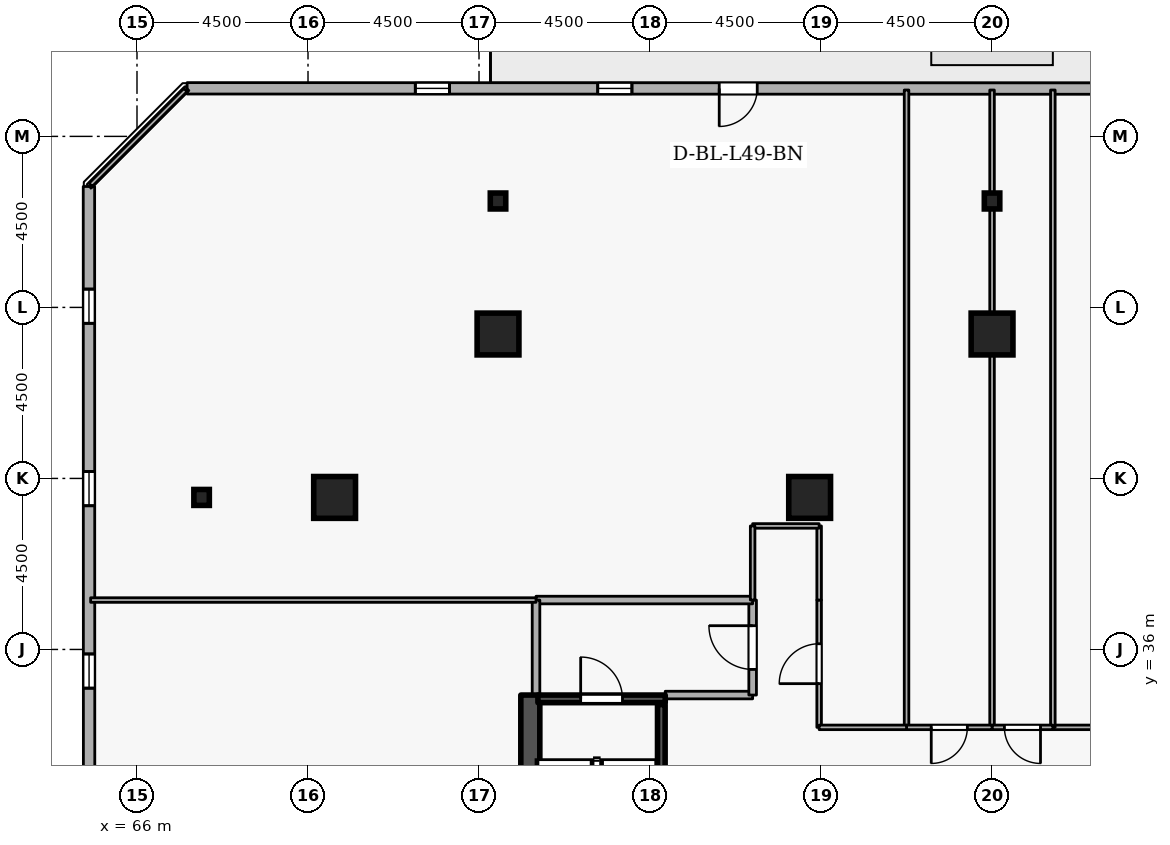
"""IFC4 building model, lengths in metres.
Left out: names, types, materials, properties, quantities, classifications, styles, units other than length and angle.
Written with IfcOpenShell. Run it as: python <this file> out.ifc"""

import sys

from ifc_helpers import new_model, si_unit, direction, frame, frame_2d, origin, origin_2d, place, context, subcontext, project, spatial, rectangle, i_section, extrude, element, fill, save


model = new_model("IFC4")
c1 = context("Model", 3, precision=1e-05, world=origin(), true_north=direction((0.0, 1.0)))
c2 = subcontext(c1, "Body", "Model", "MODEL_VIEW")
j1 = project(units=[si_unit("LENGTHUNIT", "METRE"), si_unit("PLANEANGLEUNIT", "RADIAN")], contexts=[c1])
p1 = place(None, origin())
s1 = spatial("IfcSite", under=j1, at=p1, CompositionType="ELEMENT")
p2 = place(p1, origin())
s2 = spatial("IfcBuilding", under=s1, at=p2, CompositionType="ELEMENT")
p3 = place(p2, frame((0.0, 0.0, 185.7)))
s3 = spatial("IfcBuildingStorey", under=s2, at=p3, CompositionType="ELEMENT", Elevation=185.7)
p4 = place(p3, frame((76.35, 19.2, 0.0), z_axis=(0.0, 0.0, 1.0), x_axis=(0.0, 1.0, 0.0)))
e1 = element("IfcWall", 1, at=p4, inside=s3, PredefinedType="SHEAR", context=c2, shape_type="SweptSolid", body=[
    extrude(rectangle(XDim=15.6, YDim=0.5, at=frame_2d((7.8, 0.0))), origin(), (0.0, 0.0, 1.0), 3.6),
])
for number, where, z_axis, x_axis in (
    (2, (88.5, 44.3, 0.0), (0.0, 0.0, 1.0), (1.0, 0.0, 0.0)),
    (3, (75.5, 44.3, 0.0), (0.0, 0.0, 1.0), (1.0, 0.0, 0.0)),
    (4, (71.2, 40.0, 0.0), (0.0, 0.0, 1.0), (1.0, 0.0, 0.0)),
    (5, (83.7, 40.0, 0.0), (0.0, 0.0, 1.0), (1.0, 0.0, 0.0)),
):
    element("IfcColumn", number, at=place(p3, frame(where, z_axis=z_axis, x_axis=x_axis)), inside=s3, PredefinedType="COLUMN", context=c2, shape_type="SweptSolid", body=[
        extrude(rectangle(XDim=1.1, YDim=1.1, at=origin_2d()), origin(), (0.0, 0.0, 1.0), 3.6),
    ])
for number, where, z_axis, x_axis in (
    (6, (88.5, 47.8, 0.0), (0.0, 0.0, 1.0), (1.0, 0.0, 0.0)),
    (7, (75.5, 47.8, 0.0), (0.0, 0.0, 1.0), (1.0, 0.0, 0.0)),
    (8, (67.7, 40.0, 0.0), (0.0, 0.0, 1.0), (1.0, 0.0, 0.0)),
):
    element("IfcColumn", number, at=place(p3, frame(where, z_axis=z_axis, x_axis=x_axis)), inside=s3, PredefinedType="COLUMN", context=c2, shape_type="SweptSolid", body=[
        extrude(i_section(OverallWidth=0.407, OverallDepth=0.419, WebThickness=0.031, FlangeThickness=0.049, FilletRadius=0.015, at=origin_2d()), origin(), (0.0, 0.0, 1.0), 3.6),
    ])
p5 = place(p3, frame((100.924, 50.756, 0.0), z_axis=(0.0, 0.0, 1.0), x_axis=(-0.999999963872, 0.000268805477, 0.0)))
e9 = element("IfcWall", 9, at=p5, inside=s3, PredefinedType="STANDARD", context=c2, shape_type="SweptSolid", body=[
    extrude(rectangle(XDim=33.605, YDim=0.3, at=frame_2d((16.802, 0.0))), origin(), (0.0, 0.0, 1.0), 2.7),
])
p6 = place(p5, frame((18.603, 0.0, 0.0)))
e10 = element("IfcOpeningElement", 10, at=p6, cuts=e9, PredefinedType="OPENING", context=c2, shape_type="SweptSolid", body=[
    extrude(rectangle(XDim=1.0, YDim=2.08, at=frame_2d((0.5, 1.04))), frame((0.0, 0.16, 0.0), z_axis=(0.0, -1.0, 0.0), x_axis=(1.0, 0.0, 0.0)), (0.0, 0.0, 1.0), 0.32),
])
p7 = place(p5, frame((2.7, 0.0, 0.72)))
e11 = element("IfcOpeningElement", 11, at=p7, cuts=e9, PredefinedType="OPENING", context=c2, shape_type="SweptSolid", body=[
    extrude(rectangle(XDim=0.9, YDim=1.75, at=frame_2d((0.45, 0.875))), frame((0.0, 0.16, 0.0), z_axis=(0.0, -1.0, 0.0), x_axis=(1.0, 0.0, 0.0)), (0.0, 0.0, 1.0), 0.32),
])
p8 = place(p5, frame((7.5, 0.0, 0.72)))
e12 = element("IfcOpeningElement", 12, at=p8, cuts=e9, PredefinedType="OPENING", context=c2, shape_type="SweptSolid", body=[
    extrude(rectangle(XDim=0.9, YDim=1.75, at=frame_2d((0.45, 0.875))), frame((0.0, 0.16, 0.0), z_axis=(0.0, -1.0, 0.0), x_axis=(1.0, 0.0, 0.0)), (0.0, 0.0, 1.0), 0.32),
])
p9 = place(p5, frame((21.9, 0.0, 0.72)))
e13 = element("IfcOpeningElement", 13, at=p9, cuts=e9, PredefinedType="OPENING", context=c2, shape_type="SweptSolid", body=[
    extrude(rectangle(XDim=0.9, YDim=1.75, at=frame_2d((0.45, 0.875))), frame((0.0, 0.16, 0.0), z_axis=(0.0, -1.0, 0.0), x_axis=(1.0, 0.0, 0.0)), (0.0, 0.0, 1.0), 0.32),
])
p10 = place(p5, frame((26.7, 0.0, 0.72)))
e14 = element("IfcOpeningElement", 14, at=p10, cuts=e9, PredefinedType="OPENING", context=c2, shape_type="SweptSolid", body=[
    extrude(rectangle(XDim=0.9, YDim=1.75, at=frame_2d((0.45, 0.875))), frame((0.0, 0.16, 0.0), z_axis=(0.0, -1.0, 0.0), x_axis=(1.0, 0.0, 0.0)), (0.0, 0.0, 1.0), 0.32),
])
p11 = place(p3, frame((64.735, 48.181, 0.0), z_axis=(0.0, 0.0, 1.0), x_axis=(0.000268805477, -0.999999963872, 0.0)))
e15 = element("IfcWall", 15, at=p11, inside=s3, PredefinedType="STANDARD", context=c2, shape_type="SweptSolid", body=[
    extrude(rectangle(XDim=33.605, YDim=0.3, at=frame_2d((16.802, 0.0))), origin(), (0.0, 0.0, 1.0), 2.7),
])
p12 = place(p11, frame((2.7, 0.0, 0.72)))
e16 = element("IfcOpeningElement", 16, at=p12, cuts=e15, PredefinedType="OPENING", context=c2, shape_type="SweptSolid", body=[
    extrude(rectangle(XDim=0.9, YDim=1.75, at=frame_2d((0.45, 0.875))), frame((0.0, 0.16, 0.0), z_axis=(0.0, -1.0, 0.0), x_axis=(1.0, 0.0, 0.0)), (0.0, 0.0, 1.0), 0.32),
])
p13 = place(p11, frame((7.5, 0.0, 0.72)))
e17 = element("IfcOpeningElement", 17, at=p13, cuts=e15, PredefinedType="OPENING", context=c2, shape_type="SweptSolid", body=[
    extrude(rectangle(XDim=0.9, YDim=1.75, at=frame_2d((0.45, 0.875))), frame((0.0, 0.16, 0.0), z_axis=(0.0, -1.0, 0.0), x_axis=(1.0, 0.0, 0.0)), (0.0, 0.0, 1.0), 0.32),
])
p14 = place(p11, frame((12.3, 0.0, 0.72)))
e18 = element("IfcOpeningElement", 18, at=p14, cuts=e15, PredefinedType="OPENING", context=c2, shape_type="SweptSolid", body=[
    extrude(rectangle(XDim=0.9, YDim=1.75, at=frame_2d((0.45, 0.875))), frame((0.0, 0.16, 0.0), z_axis=(0.0, -1.0, 0.0), x_axis=(1.0, 0.0, 0.0)), (0.0, 0.0, 1.0), 0.32),
])
p15 = place(p11, frame((17.1, 0.0, 0.72)))
e19 = element("IfcOpeningElement", 19, at=p15, cuts=e15, PredefinedType="OPENING", context=c2, shape_type="SweptSolid", body=[
    extrude(rectangle(XDim=0.9, YDim=1.75, at=frame_2d((0.45, 0.875))), frame((0.0, 0.16, 0.0), z_axis=(0.0, -1.0, 0.0), x_axis=(1.0, 0.0, 0.0)), (0.0, 0.0, 1.0), 0.32),
])
p16 = place(p11, frame((21.9, 0.0, 0.72)))
e20 = element("IfcOpeningElement", 20, at=p16, cuts=e15, PredefinedType="OPENING", context=c2, shape_type="SweptSolid", body=[
    extrude(rectangle(XDim=0.9, YDim=1.75, at=frame_2d((0.45, 0.875))), frame((0.0, 0.16, 0.0), z_axis=(0.0, -1.0, 0.0), x_axis=(1.0, 0.0, 0.0)), (0.0, 0.0, 1.0), 0.32),
])
p17 = place(p11, frame((26.7, 0.0, 0.72)))
e21 = element("IfcOpeningElement", 21, at=p17, cuts=e15, PredefinedType="OPENING", context=c2, shape_type="SweptSolid", body=[
    extrude(rectangle(XDim=0.9, YDim=1.75, at=frame_2d((0.45, 0.875))), frame((0.0, 0.16, 0.0), z_axis=(0.0, -1.0, 0.0), x_axis=(1.0, 0.0, 0.0)), (0.0, 0.0, 1.0), 0.32),
])
p18 = place(p3, frame((76.55, 34.7, 0.0), z_axis=(0.0, 0.0, 1.0), x_axis=(1.0, 0.0, 0.0)))
e22 = element("IfcWall", 22, at=p18, inside=s3, PredefinedType="SHEAR", context=c2, shape_type="SweptSolid", body=[
    extrude(rectangle(XDim=3.35, YDim=0.2, at=frame_2d((1.675, 0.0))), origin(), (0.0, 0.0, 1.0), 3.6),
])
p19 = place(p18, frame((1.125, 0.0, 0.0)))
e23 = element("IfcOpeningElement", 23, at=p19, cuts=e22, PredefinedType="OPENING", context=c2, shape_type="SweptSolid", body=[
    extrude(rectangle(XDim=1.1, YDim=2.1, at=frame_2d((0.55, 1.05))), frame((0.0, 0.11, 0.0), z_axis=(0.0, -1.0, 0.0), x_axis=(1.0, 0.0, 0.0)), (0.0, 0.0, 1.0), 0.22),
])
p20 = place(p3, frame((79.797, 27.45, 0.0), z_axis=(0.0, 0.0, 1.0), x_axis=(0.0, 1.0, 0.0)))
e24 = element("IfcWall", 24, at=p20, inside=s3, PredefinedType="SHEAR", context=c2, shape_type="SweptSolid", body=[
    extrude(rectangle(XDim=7.1, YDim=0.2, at=frame_2d((3.55, 0.0))), origin(), (0.0, 0.0, 1.0), 3.6),
])
p21 = place(p3, frame((79.9, 34.8, 0.0), z_axis=(0.0, 0.0, 1.0), x_axis=(1.0, 0.0, 0.0)))
e25 = element("IfcWall", 25, at=p21, inside=s3, PredefinedType="STANDARD", context=c2, shape_type="SweptSolid", body=[
    extrude(rectangle(XDim=2.3, YDim=0.2, at=frame_2d((1.15, 0.0))), origin(), (0.0, 0.0, 1.0), 2.545),
])
p22 = place(p3, frame((82.2, 34.8, 0.0), z_axis=(0.0, 0.0, 1.0), x_axis=(0.0, 1.0, 0.0)))
e26 = element("IfcWall", 26, at=p22, inside=s3, PredefinedType="STANDARD", context=c2, shape_type="SweptSolid", body=[
    extrude(rectangle(XDim=2.5, YDim=0.2, at=frame_2d((1.25, 0.0))), origin(), (0.0, 0.0, 1.0), 3.34),
])
p23 = place(p22, frame((0.675, 0.0, 0.0)))
e27 = element("IfcOpeningElement", 27, at=p23, cuts=e26, PredefinedType="OPENING", context=c2, shape_type="SweptSolid", body=[
    extrude(rectangle(XDim=1.15, YDim=2.1, at=frame_2d((0.575, 1.05))), frame((0.0, 0.11, 0.0), z_axis=(0.0, -1.0, 0.0), x_axis=(1.0, 0.0, 0.0)), (0.0, 0.0, 1.0), 0.22),
])
p24 = place(p3, frame((82.2, 37.3, 0.0), z_axis=(0.0, 0.0, 1.0), x_axis=(-1.0, 0.0, 0.0)))
e28 = element("IfcWall", 28, at=p24, inside=s3, PredefinedType="STANDARD", context=c2, shape_type="SweptSolid", body=[
    extrude(rectangle(XDim=5.7, YDim=0.2, at=frame_2d((2.85, 0.0))), origin(), (0.0, 0.0, 1.0), 3.34),
])
p25 = place(p3, frame((76.5, 37.3, 0.0), z_axis=(0.0, 0.0, 1.0), x_axis=(0.0, -1.0, 0.0)))
e29 = element("IfcWall", 29, at=p25, inside=s3, PredefinedType="STANDARD", context=c2, shape_type="SweptSolid", body=[
    extrude(rectangle(XDim=2.5, YDim=0.2, at=frame_2d((1.25, 0.0))), origin(), (0.0, 0.0, 1.0), 3.34),
])
p26 = place(p3, frame((93.05, 33.95, 0.0), z_axis=(0.0, 0.0, 1.0), x_axis=(-1.0, 0.0, 0.0)))
e30 = element("IfcWall", 30, at=p26, inside=s3, PredefinedType="PARTITIONING", context=c2, shape_type="SweptSolid", body=[
    extrude(rectangle(XDim=2.95, YDim=0.12, at=frame_2d((1.475, 0.0))), origin(), (0.0, 0.0, 1.0), 3.34),
])
p27 = place(p3, frame((90.1, 33.95, 0.0), z_axis=(0.0, 0.0, 1.0), x_axis=(0.0, 1.0, 0.0)))
e31 = element("IfcWall", 31, at=p27, inside=s3, PredefinedType="PARTITIONING", context=c2, shape_type="SweptSolid", body=[
    extrude(rectangle(XDim=16.77, YDim=0.12, at=frame_2d((8.385, 0.0))), origin(), (0.0, 0.0, 1.0), 3.34),
])
p28 = place(p3, frame((88.5, 33.95, 0.0), z_axis=(0.0, 0.0, 1.0), x_axis=(0.0, 1.0, 0.0)))
e32 = element("IfcWall", 32, at=p28, inside=s3, PredefinedType="PARTITIONING", context=c2, shape_type="SweptSolid", body=[
    extrude(rectangle(XDim=16.77, YDim=0.12, at=frame_2d((8.385, 0.0))), origin(), (0.0, 0.0, 1.0), 2.878),
])
p29 = place(p3, frame((90.1, 33.95, 0.0), z_axis=(0.0, 0.0, 1.0), x_axis=(-1.0, 0.0, 0.0)))
e33 = element("IfcWall", 33, at=p29, inside=s3, PredefinedType="PARTITIONING", context=c2, shape_type="SweptSolid", body=[
    extrude(rectangle(XDim=1.6, YDim=0.12, at=frame_2d((0.8, 0.0))), origin(), (0.0, 0.0, 1.0), 3.34),
])
p30 = place(p29, frame((0.325, 0.0, 0.0)))
e34 = element("IfcOpeningElement", 34, at=p30, cuts=e33, PredefinedType="OPENING", context=c2, shape_type="SweptSolid", body=[
    extrude(rectangle(XDim=0.95, YDim=2.1, at=frame_2d((0.475, 1.05))), frame((0.0, 0.07, 0.0), z_axis=(0.0, -1.0, 0.0), x_axis=(1.0, 0.0, 0.0)), (0.0, 0.0, 1.0), 0.14),
])
p31 = place(p3, frame((86.25, 33.95, 0.0), z_axis=(0.0, 0.0, 1.0), x_axis=(0.0, 1.0, 0.0)))
e35 = element("IfcWall", 35, at=p31, inside=s3, PredefinedType="PARTITIONING", context=c2, shape_type="SweptSolid", body=[
    extrude(rectangle(XDim=16.77, YDim=0.12, at=frame_2d((8.385, 0.0))), origin(), (0.0, 0.0, 1.0), 3.34),
])
p32 = place(p3, frame((88.5, 33.95, 0.0), z_axis=(0.0, 0.0, 1.0), x_axis=(-1.0, 0.0, 0.0)))
e36 = element("IfcWall", 36, at=p32, inside=s3, PredefinedType="PARTITIONING", context=c2, shape_type="SweptSolid", body=[
    extrude(rectangle(XDim=2.25, YDim=0.12, at=frame_2d((1.125, 0.0))), origin(), (0.0, 0.0, 1.0), 3.34),
])
p33 = place(p32, frame((0.65, 0.0, 0.0)))
e37 = element("IfcOpeningElement", 37, at=p33, cuts=e36, PredefinedType="OPENING", context=c2, shape_type="SweptSolid", body=[
    extrude(rectangle(XDim=0.95, YDim=2.1, at=frame_2d((0.475, 1.05))), frame((0.0, 0.07, 0.0), z_axis=(0.0, -1.0, 0.0), x_axis=(1.0, 0.0, 0.0)), (0.0, 0.0, 1.0), 0.14),
])
p34 = place(p3, frame((83.95, 33.95, 0.0), z_axis=(0.0, 0.0, 1.0), x_axis=(0.0, 1.0, 0.0)))
e38 = element("IfcWall", 38, at=p34, inside=s3, PredefinedType="PARTITIONING", context=c2, shape_type="SweptSolid", body=[
    extrude(rectangle(XDim=3.35, YDim=0.12, at=frame_2d((1.675, 0.0))), origin(), (0.0, 0.0, 1.0), 3.34),
])
p35 = place(p34, frame((1.15, 0.0, 0.0)))
e39 = element("IfcOpeningElement", 39, at=p35, cuts=e38, PredefinedType="OPENING", context=c2, shape_type="SweptSolid", body=[
    extrude(rectangle(XDim=1.05, YDim=2.1, at=frame_2d((0.525, 1.05))), frame((0.0, 0.07, 0.0), z_axis=(0.0, -1.0, 0.0), x_axis=(1.0, 0.0, 0.0)), (0.0, 0.0, 1.0), 0.14),
])
p36 = place(p3, frame((83.95, 37.3, 0.0), z_axis=(0.0, 0.0, 1.0), x_axis=(0.0, 1.0, 0.0)))
e40 = element("IfcWall", 40, at=p36, inside=s3, PredefinedType="PARTITIONING", context=c2, shape_type="SweptSolid", body=[
    extrude(rectangle(XDim=1.95, YDim=0.12, at=frame_2d((0.975, 0.0))), origin(), (0.0, 0.0, 1.0), 3.34),
])
p37 = place(p3, frame((83.95, 39.25, 0.0), z_axis=(0.0, 0.0, 1.0), x_axis=(-1.0, 0.0, 0.0)))
e41 = element("IfcWall", 41, at=p37, inside=s3, PredefinedType="PARTITIONING", context=c2, shape_type="SweptSolid", body=[
    extrude(rectangle(XDim=1.75, YDim=0.12, at=frame_2d((0.875, 0.0))), origin(), (0.0, 0.0, 1.0), 3.34),
])
p38 = place(p3, frame((82.2, 39.25, 0.0), z_axis=(0.0, 0.0, 1.0), x_axis=(0.0, -1.0, 0.0)))
e42 = element("IfcWall", 42, at=p38, inside=s3, PredefinedType="PARTITIONING", context=c2, shape_type="SweptSolid", body=[
    extrude(rectangle(XDim=1.95, YDim=0.12, at=frame_2d((0.975, 0.0))), origin(), (0.0, 0.0, 1.0), 3.34),
])
p39 = place(p3, frame((76.5, 37.3, 0.0), z_axis=(0.0, 0.0, 1.0), x_axis=(-1.0, 0.0, 0.0)))
e43 = element("IfcWall", 43, at=p39, inside=s3, PredefinedType="PARTITIONING", context=c2, shape_type="SweptSolid", body=[
    extrude(rectangle(XDim=11.72, YDim=0.12, at=frame_2d((5.86, 0.0))), origin(), (0.0, 0.0, 1.0), 3.34),
])
p40 = place(p3, frame((64.78, 48.225, 0.0), z_axis=(0.0, 0.0, 1.0), x_axis=(0.707106781187, 0.707106781187, 0.0)))
e44 = element("IfcWall", 44, at=p40, inside=s3, PredefinedType="PARTITIONING", context=c2, shape_type="SweptSolid", body=[
    extrude(rectangle(XDim=3.528, YDim=0.12, at=frame_2d((1.764, 0.0))), origin(), (0.0, 0.0, 1.0), 3.34),
])
p41 = place(p3, frame((86.25, 33.95, 0.0), z_axis=(0.0, 0.0, 1.0), x_axis=(-1.0, 0.0, 0.0)))
e45 = element("IfcWall", 45, at=p41, inside=s3, PredefinedType="PARTITIONING", context=c2, shape_type="SweptSolid", body=[
    extrude(rectangle(XDim=2.3, YDim=0.12, at=frame_2d((1.15, 0.0))), origin(), (0.0, 0.0, 1.0), 3.34),
])
p42 = place(p6, origin())
e46 = element("IfcDoor", 46, at=p42, inside=s3, OperationType="SINGLE_SWING_RIGHT", PredefinedType="DOOR", context=c2, shape_type="SweptSolid", body=[
    extrude(rectangle(XDim=1.0, YDim=2.08, at=frame_2d((0.5, 1.04))), frame((0.0, 0.025, 0.0), z_axis=(0.0, -1.0, 0.0), x_axis=(1.0, 0.0, 0.0)), (0.0, 0.0, 1.0), 0.05),
])
fill(e10, e46)
p43 = place(p9, origin())
e47 = element("IfcWindow", 47, at=p43, inside=s3, PartitioningType="SINGLE_PANEL", PredefinedType="WINDOW", context=c2, shape_type="SweptSolid", body=[
    extrude(rectangle(XDim=0.9, YDim=1.75, at=frame_2d((0.45, 0.875))), frame((0.0, 0.03, 0.0), z_axis=(0.0, -1.0, 0.0), x_axis=(1.0, 0.0, 0.0)), (0.0, 0.0, 1.0), 0.06),
])
fill(e13, e47)
p44 = place(p10, origin())
e48 = element("IfcWindow", 48, at=p44, inside=s3, PartitioningType="SINGLE_PANEL", PredefinedType="WINDOW", context=c2, shape_type="SweptSolid", body=[
    extrude(rectangle(XDim=0.9, YDim=1.75, at=frame_2d((0.45, 0.875))), frame((0.0, 0.03, 0.0), z_axis=(0.0, -1.0, 0.0), x_axis=(1.0, 0.0, 0.0)), (0.0, 0.0, 1.0), 0.06),
])
fill(e14, e48)
p45 = place(p12, origin())
e49 = element("IfcWindow", 49, at=p45, inside=s3, PartitioningType="SINGLE_PANEL", PredefinedType="WINDOW", context=c2, shape_type="SweptSolid", body=[
    extrude(rectangle(XDim=0.9, YDim=1.75, at=frame_2d((0.45, 0.875))), frame((0.0, 0.03, 0.0), z_axis=(0.0, -1.0, 0.0), x_axis=(1.0, 0.0, 0.0)), (0.0, 0.0, 1.0), 0.06),
])
fill(e16, e49)
p46 = place(p13, origin())
e50 = element("IfcWindow", 50, at=p46, inside=s3, PartitioningType="SINGLE_PANEL", PredefinedType="WINDOW", context=c2, shape_type="SweptSolid", body=[
    extrude(rectangle(XDim=0.9, YDim=1.75, at=frame_2d((0.45, 0.875))), frame((0.0, 0.03, 0.0), z_axis=(0.0, -1.0, 0.0), x_axis=(1.0, 0.0, 0.0)), (0.0, 0.0, 1.0), 0.06),
])
fill(e17, e50)
p47 = place(p14, origin())
e51 = element("IfcWindow", 51, at=p47, inside=s3, PartitioningType="SINGLE_PANEL", PredefinedType="WINDOW", context=c2, shape_type="SweptSolid", body=[
    extrude(rectangle(XDim=0.9, YDim=1.75, at=frame_2d((0.45, 0.875))), frame((0.0, 0.03, 0.0), z_axis=(0.0, -1.0, 0.0), x_axis=(1.0, 0.0, 0.0)), (0.0, 0.0, 1.0), 0.06),
])
fill(e18, e51)
p48 = place(p19, origin())
e52 = element("IfcDoor", 52, at=p48, inside=s3, OperationType="SINGLE_SWING_LEFT", PredefinedType="DOOR", context=c2, shape_type="SweptSolid", body=[
    extrude(rectangle(XDim=1.1, YDim=2.1, at=frame_2d((0.55, 1.05))), frame((0.0, 0.025, 0.0), z_axis=(0.0, -1.0, 0.0), x_axis=(1.0, 0.0, 0.0)), (0.0, 0.0, 1.0), 0.05),
])
fill(e23, e52)
p49 = place(p23, origin())
e53 = element("IfcDoor", 53, at=p49, inside=s3, OperationType="SINGLE_SWING_RIGHT", PredefinedType="DOOR", context=c2, shape_type="SweptSolid", body=[
    extrude(rectangle(XDim=1.15, YDim=2.1, at=frame_2d((0.575, 1.05))), frame((0.0, 0.025, 0.0), z_axis=(0.0, -1.0, 0.0), x_axis=(1.0, 0.0, 0.0)), (0.0, 0.0, 1.0), 0.05),
])
fill(e27, e53)
p50 = place(p30, origin())
e54 = element("IfcDoor", 54, at=p50, inside=s3, OperationType="SINGLE_SWING_LEFT", PredefinedType="DOOR", context=c2, shape_type="SweptSolid", body=[
    extrude(rectangle(XDim=0.95, YDim=2.1, at=frame_2d((0.475, 1.05))), frame((0.0, 0.025, 0.0), z_axis=(0.0, -1.0, 0.0), x_axis=(1.0, 0.0, 0.0)), (0.0, 0.0, 1.0), 0.05),
])
fill(e34, e54)
p51 = place(p33, origin())
e55 = element("IfcDoor", 55, at=p51, inside=s3, OperationType="SINGLE_SWING_RIGHT", PredefinedType="DOOR", context=c2, shape_type="SweptSolid", body=[
    extrude(rectangle(XDim=0.95, YDim=2.1, at=frame_2d((0.475, 1.05))), frame((0.0, 0.025, 0.0), z_axis=(0.0, -1.0, 0.0), x_axis=(1.0, 0.0, 0.0)), (0.0, 0.0, 1.0), 0.05),
])
fill(e37, e55)
p52 = place(p35, origin())
e56 = element("IfcDoor", 56, at=p52, inside=s3, OperationType="SINGLE_SWING_LEFT", PredefinedType="DOOR", context=c2, shape_type="SweptSolid", body=[
    extrude(rectangle(XDim=1.05, YDim=2.1, at=frame_2d((0.525, 1.05))), frame((0.0, 0.025, 0.0), z_axis=(0.0, -1.0, 0.0), x_axis=(1.0, 0.0, 0.0)), (0.0, 0.0, 1.0), 0.05),
])
fill(e39, e56)
save(model, sys.argv[1])
